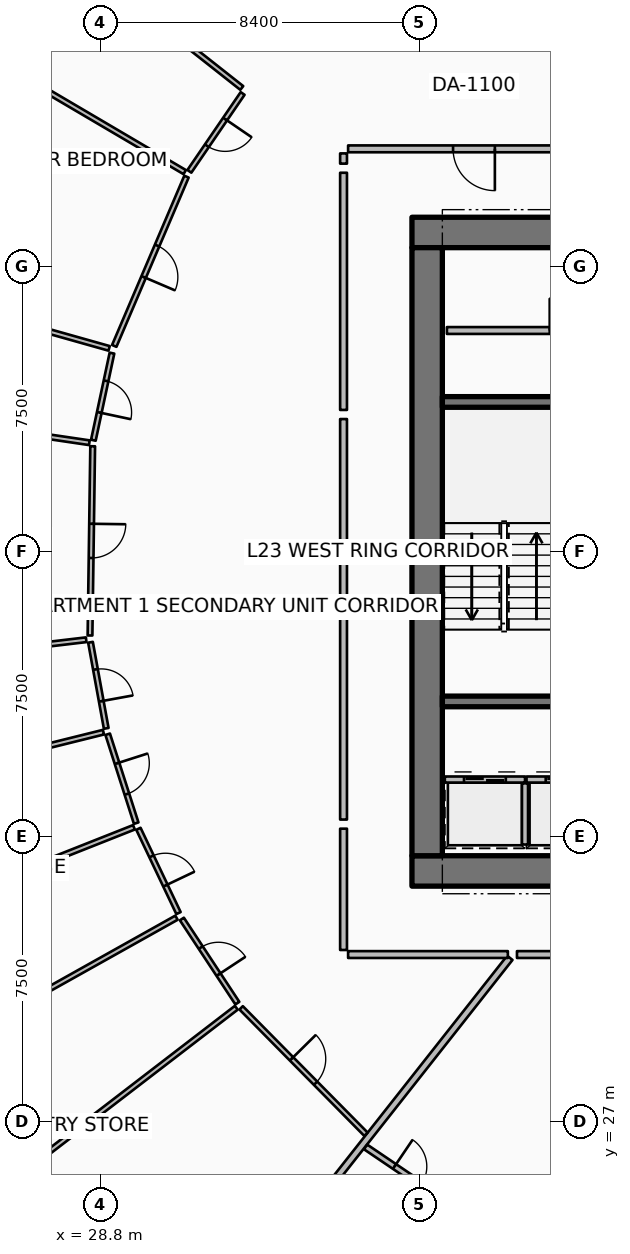
"""IFC4 building model, lengths in metres.
Left out: names, types, materials, properties, quantities, classifications, styles, units other than length and angle.
Written with IfcOpenShell. Run it as: python <this file> out.ifc"""

import sys

from ifc_helpers import new_model, si_unit, direction, frame, frame_2d, origin, place, context, subcontext, project, spatial, rectangle, extrude, element, fill, save


model = new_model("IFC4")
c1 = context("Model", 3, precision=1e-05, world=origin(), true_north=direction((0.0, 1.0)))
c2 = subcontext(c1, "Body", "Model", "MODEL_VIEW")
j1 = project(units=[si_unit("LENGTHUNIT", "METRE"), si_unit("PLANEANGLEUNIT", "RADIAN")], contexts=[c1])
p1 = place(None, origin())
s1 = spatial("IfcSite", under=j1, at=p1, CompositionType="ELEMENT")
p2 = place(p1, origin())
s2 = spatial("IfcBuilding", under=s1, at=p2, CompositionType="ELEMENT")
p3 = place(p2, frame((0.0, 0.0, 93.9)))
s3 = spatial("IfcBuildingStorey", under=s2, at=p3, CompositionType="ELEMENT", Elevation=93.9)
for number, where, z_axis, x_axis in (
    (1, (37.0, 33.6, 0.0), (0.0, 0.0, 1.0), (1.0, 0.0, 0.0)),
    (2, (37.0, 50.4, 0.0), (0.0, 0.0, 1.0), (1.0, 0.0, 0.0)),
):
    element("IfcWall", number, at=place(p3, frame(where, z_axis=z_axis, x_axis=x_axis)), inside=s3, PredefinedType="SHEAR", context=c2, shape_type="SweptSolid", body=[
        extrude(rectangle(XDim=9.9, YDim=0.8, at=frame_2d((4.95, 0.0))), origin(), (0.0, 0.0, 1.0), 3.75),
    ])
p4 = place(p3, frame((37.4, 34.0, 0.0), z_axis=(0.0, 0.0, 1.0), x_axis=(0.0, 1.0, 0.0)))
e3 = element("IfcWall", 3, at=p4, inside=s3, PredefinedType="SHEAR", context=c2, shape_type="SweptSolid", body=[
    extrude(rectangle(XDim=16.0, YDim=0.8, at=frame_2d((8.0, 0.0))), origin(), (0.0, 0.0, 1.0), 3.75),
])
for number, where, z_axis, x_axis in (
    (4, (37.8, 38.06, 0.0), (0.0, 0.0, 1.0), (1.0, 0.0, 0.0)),
    (5, (37.8, 45.94, 0.0), (0.0, 0.0, 1.0), (1.0, 0.0, 0.0)),
):
    element("IfcWall", number, at=place(p3, frame(where, z_axis=z_axis, x_axis=x_axis)), inside=s3, PredefinedType="SHEAR", context=c2, shape_type="SweptSolid", body=[
        extrude(rectangle(XDim=3.5, YDim=0.28, at=frame_2d((1.75, 0.0))), origin(), (0.0, 0.0, 1.0), 3.75),
    ])
p5 = place(p3, frame((37.865, 36.005, 0.0), z_axis=(0.0, 0.0, 1.0), x_axis=(1.0, 0.0, 0.0)))
e6 = element("IfcWall", 6, at=p5, inside=s3, PredefinedType="PARTITIONING", context=c2, shape_type="SweptSolid", body=[
    extrude(rectangle(XDim=2.11, YDim=0.16, at=frame_2d((1.055, 0.0))), origin(), (0.0, 0.0, 1.0), 3.5),
])
p6 = place(p5, frame((0.505, 0.0, 0.0)))
e7 = element("IfcOpeningElement", 7, at=p6, cuts=e6, PredefinedType="OPENING", context=c2, shape_type="SweptSolid", body=[
    extrude(rectangle(XDim=1.1, YDim=2.1, at=frame_2d((0.55, 1.05))), frame((0.0, 0.09, 0.0), z_axis=(0.0, -1.0, 0.0), x_axis=(1.0, 0.0, 0.0)), (0.0, 0.0, 1.0), 0.18),
])
p7 = place(p3, frame((39.975, 34.295, 0.0), z_axis=(0.0, 0.0, 1.0), x_axis=(0.0, 1.0, 0.0)))
e8 = element("IfcWall", 8, at=p7, inside=s3, PredefinedType="PARTITIONING", context=c2, shape_type="SweptSolid", body=[
    extrude(rectangle(XDim=1.61, YDim=0.16, at=frame_2d((0.805, 0.0))), origin(), (0.0, 0.0, 1.0), 3.5),
])
p8 = place(p3, frame((40.015, 36.005, 0.0), z_axis=(0.0, 0.0, 1.0), x_axis=(1.0, 0.0, 0.0)))
e9 = element("IfcWall", 9, at=p8, inside=s3, PredefinedType="PARTITIONING", context=c2, shape_type="SweptSolid", body=[
    extrude(rectangle(XDim=2.11, YDim=0.16, at=frame_2d((1.055, 0.0))), origin(), (0.0, 0.0, 1.0), 3.5),
])
p9 = place(p8, frame((0.505, 0.0, 0.0)))
e10 = element("IfcOpeningElement", 10, at=p9, cuts=e9, PredefinedType="OPENING", context=c2, shape_type="SweptSolid", body=[
    extrude(rectangle(XDim=1.1, YDim=2.1, at=frame_2d((0.55, 1.05))), frame((0.0, 0.09, 0.0), z_axis=(0.0, -1.0, 0.0), x_axis=(1.0, 0.0, 0.0)), (0.0, 0.0, 1.0), 0.18),
])
p10 = place(p3, frame((37.92, 47.82, 0.0), z_axis=(0.0, 0.0, 1.0), x_axis=(1.0, 0.0, 0.0)))
e11 = element("IfcWall", 11, at=p10, inside=s3, PredefinedType="PARTITIONING", context=c2, shape_type="SweptSolid", body=[
    extrude(rectangle(XDim=6.26, YDim=0.18, at=frame_2d((3.13, 0.0))), origin(), (0.0, 0.0, 1.0), 3.5),
])
p11 = place(p10, frame((2.705, 0.0, 0.0)))
e12 = element("IfcOpeningElement", 12, at=p11, cuts=e11, PredefinedType="OPENING", context=c2, shape_type="SweptSolid", body=[
    extrude(rectangle(XDim=0.85, YDim=2.06, at=frame_2d((0.425, 1.03))), frame((0.0, 0.1, 0.0), z_axis=(0.0, -1.0, 0.0), x_axis=(1.0, 0.0, 0.0)), (0.0, 0.0, 1.0), 0.2),
])
p12 = place(p3, frame((39.575, 31.314, 0.0), z_axis=(0.0, 0.0, 1.0), x_axis=(-0.619083417853, -0.785325233098, 0.0)))
e13 = element("IfcWall", 13, at=p12, inside=s3, PredefinedType="PARTITIONING", context=c2, shape_type="SweptSolid", body=[
    extrude(rectangle(XDim=15.063, YDim=0.18, at=frame_2d((7.532, 0.0))), origin(), (0.0, 0.0, 1.0), 2.94),
])
p13 = place(p3, frame((41.944, 52.6, 0.0), z_axis=(0.0, 0.0, 1.0), x_axis=(-1.0, 0.0, 0.0)))
e14 = element("IfcWall", 14, at=p13, inside=s3, PredefinedType="PARTITIONING", context=c2, shape_type="SweptSolid", body=[
    extrude(rectangle(XDim=6.624, YDim=0.18, at=frame_2d((3.312, 0.0))), origin(), (0.0, 0.0, 1.0), 2.94),
])
p14 = place(p13, frame((2.762, 0.0, 0.0)))
e15 = element("IfcOpeningElement", 15, at=p14, cuts=e14, PredefinedType="OPENING", context=c2, shape_type="SweptSolid", body=[
    extrude(rectangle(XDim=1.1, YDim=2.1, at=frame_2d((0.55, 1.05))), frame((0.0, 0.1, 0.0), z_axis=(0.0, -1.0, 0.0), x_axis=(1.0, 0.0, 0.0)), (0.0, 0.0, 1.0), 0.2),
])
p15 = place(p3, frame((35.2, 52.48, 0.0), z_axis=(0.0, 0.0, 1.0), x_axis=(0.0, -1.0, 0.0)))
e16 = element("IfcWall", 16, at=p15, inside=s3, PredefinedType="PARTITIONING", context=c2, shape_type="SweptSolid", body=[
    extrude(rectangle(XDim=0.269, YDim=0.18, at=frame_2d((0.135, 0.0))), origin(), (0.0, 0.0, 1.0), 2.94),
])
p16 = place(p3, frame((35.2, 51.971, 0.0), z_axis=(0.0, 0.0, 1.0), x_axis=(0.0, -1.0, 0.0)))
e17 = element("IfcWall", 17, at=p16, inside=s3, PredefinedType="PARTITIONING", context=c2, shape_type="SweptSolid", body=[
    extrude(rectangle(XDim=6.241, YDim=0.18, at=frame_2d((3.12, 0.0))), origin(), (0.0, 0.0, 1.0), 2.94),
])
p17 = place(p3, frame((32.522, 54.202, 0.0), z_axis=(0.0, 0.0, 1.0), x_axis=(-0.785296086335, 0.619120389574, 0.0)))
e18 = element("IfcWall", 18, at=p17, inside=s3, PredefinedType="PARTITIONING", context=c2, shape_type="SweptSolid", body=[
    extrude(rectangle(XDim=6.529, YDim=0.125, at=frame_2d((3.265, 0.0))), origin(), (0.0, 0.0, 1.0), 2.94),
])
p18 = place(p3, frame((31.021, 51.988, 0.0), z_axis=(0.0, 0.0, 1.0), x_axis=(-0.86191844443, 0.507046935846, 0.0)))
e19 = element("IfcWall", 19, at=p18, inside=s3, PredefinedType="PARTITIONING", context=c2, shape_type="SweptSolid", body=[
    extrude(rectangle(XDim=6.765, YDim=0.125, at=frame_2d((3.383, 0.0))), origin(), (0.0, 0.0, 1.0), 2.94),
])
p19 = place(p3, frame((32.544, 54.057, 0.0), z_axis=(0.0, 0.0, 1.0), x_axis=(-0.564377111566, -0.825517096092, 0.0)))
e20 = element("IfcWall", 20, at=p19, inside=s3, PredefinedType="PARTITIONING", context=c2, shape_type="SweptSolid", body=[
    extrude(rectangle(XDim=2.482, YDim=0.125, at=frame_2d((1.241, 0.0))), origin(), (0.0, 0.0, 1.0), 2.94),
])
p20 = place(p19, frame((0.816, 0.0, 0.0)))
e21 = element("IfcOpeningElement", 21, at=p20, cuts=e20, PredefinedType="OPENING", context=c2, shape_type="SweptSolid", body=[
    extrude(rectangle(XDim=0.85, YDim=2.06, at=frame_2d((0.425, 1.03))), frame((0.0, 0.073, 0.0), z_axis=(0.0, -1.0, 0.0), x_axis=(1.0, 0.0, 0.0)), (0.0, 0.0, 1.0), 0.145),
])
p21 = place(p3, frame((31.067, 51.868, 0.0), z_axis=(0.0, 0.0, 1.0), x_axis=(-0.392470533914, -0.919764578579, 0.0)))
e22 = element("IfcWall", 22, at=p21, inside=s3, PredefinedType="PARTITIONING", context=c2, shape_type="SweptSolid", body=[
    extrude(rectangle(XDim=4.842, YDim=0.125, at=frame_2d((2.421, 0.0))), origin(), (0.0, 0.0, 1.0), 2.94),
])
p22 = place(p21, frame((1.971, 0.0, 0.0)))
e23 = element("IfcOpeningElement", 23, at=p22, cuts=e22, PredefinedType="OPENING", context=c2, shape_type="SweptSolid", body=[
    extrude(rectangle(XDim=0.9, YDim=2.08, at=frame_2d((0.45, 1.04))), frame((0.0, 0.073, 0.0), z_axis=(0.0, -1.0, 0.0), x_axis=(1.0, 0.0, 0.0)), (0.0, 0.0, 1.0), 0.145),
])
p23 = place(p3, frame((35.2, 45.49, 0.0), z_axis=(0.0, 0.0, 1.0), x_axis=(0.0, -1.0, 0.0)))
e24 = element("IfcWall", 24, at=p23, inside=s3, PredefinedType="PARTITIONING", context=c2, shape_type="SweptSolid", body=[
    extrude(rectangle(XDim=4.885, YDim=0.18, at=frame_2d((2.442, 0.0))), origin(), (0.0, 0.0, 1.0), 2.94),
])
p24 = place(p3, frame((29.031, 47.35, 0.0), z_axis=(0.0, 0.0, 1.0), x_axis=(-0.962455027906, 0.271441189317, 0.0)))
e25 = element("IfcWall", 25, at=p24, inside=s3, PredefinedType="PARTITIONING", context=c2, shape_type="SweptSolid", body=[
    extrude(rectangle(XDim=8.862, YDim=0.125, at=frame_2d((4.431, 0.0))), origin(), (0.0, 0.0, 1.0), 2.94),
])
p25 = place(p3, frame((28.511, 44.867, 0.0), z_axis=(0.0, 0.0, 1.0), x_axis=(-0.989349459184, 0.145559773332, 0.0)))
e26 = element("IfcWall", 26, at=p25, inside=s3, PredefinedType="PARTITIONING", context=c2, shape_type="SweptSolid", body=[
    extrude(rectangle(XDim=8.975, YDim=0.125, at=frame_2d((4.488, 0.0))), origin(), (0.0, 0.0, 1.0), 2.94),
])
p26 = place(p3, frame((29.106, 47.225, 0.0), z_axis=(0.0, 0.0, 1.0), x_axis=(-0.208839045871, -0.977950025778, 0.0)))
e27 = element("IfcWall", 27, at=p26, inside=s3, PredefinedType="PARTITIONING", context=c2, shape_type="SweptSolid", body=[
    extrude(rectangle(XDim=2.344, YDim=0.125, at=frame_2d((1.172, 0.0))), origin(), (0.0, 0.0, 1.0), 2.94),
])
p27 = place(p26, frame((0.747, 0.0, 0.0)))
e28 = element("IfcOpeningElement", 28, at=p27, cuts=e27, PredefinedType="OPENING", context=c2, shape_type="SweptSolid", body=[
    extrude(rectangle(XDim=0.85, YDim=2.06, at=frame_2d((0.425, 1.03))), frame((0.0, 0.073, 0.0), z_axis=(0.0, -1.0, 0.0), x_axis=(1.0, 0.0, 0.0)), (0.0, 0.0, 1.0), 0.145),
])
p28 = place(p3, frame((28.599, 44.774, 0.0), z_axis=(0.0, 0.0, 1.0), x_axis=(-0.014168717323, -0.999899618687, 0.0)))
e29 = element("IfcWall", 29, at=p28, inside=s3, PredefinedType="PARTITIONING", context=c2, shape_type="SweptSolid", body=[
    extrude(rectangle(XDim=4.98, YDim=0.125, at=frame_2d((2.49, 0.0))), origin(), (0.0, 0.0, 1.0), 2.94),
])
p29 = place(p28, frame((2.04, 0.0, 0.0)))
e30 = element("IfcOpeningElement", 30, at=p29, cuts=e29, PredefinedType="OPENING", context=c2, shape_type="SweptSolid", body=[
    extrude(rectangle(XDim=0.9, YDim=2.08, at=frame_2d((0.45, 1.04))), frame((0.0, 0.073, 0.0), z_axis=(0.0, -1.0, 0.0), x_axis=(1.0, 0.0, 0.0)), (0.0, 0.0, 1.0), 0.145),
])
p30 = place(p3, frame((35.2, 40.365, 0.0), z_axis=(0.0, 0.0, 1.0), x_axis=(0.0, -1.0, 0.0)))
e31 = element("IfcWall", 31, at=p30, inside=s3, PredefinedType="PARTITIONING", context=c2, shape_type="SweptSolid", body=[
    extrude(rectangle(XDim=5.413, YDim=0.18, at=frame_2d((2.707, 0.0))), origin(), (0.0, 0.0, 1.0), 2.94),
])
p31 = place(p3, frame((28.427, 39.683, 0.0), z_axis=(0.0, 0.0, 1.0), x_axis=(-0.993070374036, -0.117521198991, 0.0)))
e32 = element("IfcWall", 32, at=p31, inside=s3, PredefinedType="PARTITIONING", context=c2, shape_type="SweptSolid", body=[
    extrude(rectangle(XDim=9.77, YDim=0.125, at=frame_2d((4.885, 0.0))), origin(), (0.0, 0.0, 1.0), 2.94),
])
p32 = place(p3, frame((28.882, 37.251, 0.0), z_axis=(0.0, 0.0, 1.0), x_axis=(-0.970501778917, -0.241093959111, 0.0)))
e33 = element("IfcWall", 33, at=p32, inside=s3, PredefinedType="PARTITIONING", context=c2, shape_type="SweptSolid", body=[
    extrude(rectangle(XDim=9.286, YDim=0.125, at=frame_2d((4.643, 0.0))), origin(), (0.0, 0.0, 1.0), 2.94),
])
p33 = place(p3, frame((29.684, 34.748, 0.0), z_axis=(0.0, 0.0, 1.0), x_axis=(-0.929782203012, -0.36811011255, 0.0)))
e34 = element("IfcWall", 34, at=p33, inside=s3, PredefinedType="PARTITIONING", context=c2, shape_type="SweptSolid", body=[
    extrude(rectangle(XDim=9.271, YDim=0.125, at=frame_2d((4.635, 0.0))), origin(), (0.0, 0.0, 1.0), 2.94),
])
p34 = place(p3, frame((28.541, 39.616, 0.0), z_axis=(0.0, 0.0, 1.0), x_axis=(0.179631908925, -0.983733895571, 0.0)))
e35 = element("IfcWall", 35, at=p34, inside=s3, PredefinedType="PARTITIONING", context=c2, shape_type="SweptSolid", body=[
    extrude(rectangle(XDim=2.302, YDim=0.125, at=frame_2d((1.151, 0.0))), origin(), (0.0, 0.0, 1.0), 2.94),
])
p35 = place(p34, frame((0.726, 0.0, 0.0)))
e36 = element("IfcOpeningElement", 36, at=p35, cuts=e35, PredefinedType="OPENING", context=c2, shape_type="SweptSolid", body=[
    extrude(rectangle(XDim=0.85, YDim=2.06, at=frame_2d((0.425, 1.03))), frame((0.0, 0.073, 0.0), z_axis=(0.0, -1.0, 0.0), x_axis=(1.0, 0.0, 0.0)), (0.0, 0.0, 1.0), 0.145),
])
p36 = place(p3, frame((28.994, 37.197, 0.0), z_axis=(0.0, 0.0, 1.0), x_axis=(0.305352731689, -0.952239313014, 0.0)))
e37 = element("IfcWall", 37, at=p36, inside=s3, PredefinedType="PARTITIONING", context=c2, shape_type="SweptSolid", body=[
    extrude(rectangle(XDim=2.456, YDim=0.125, at=frame_2d((1.228, 0.0))), origin(), (0.0, 0.0, 1.0), 2.94),
])
p37 = place(p36, frame((0.803, 0.0, 0.0)))
e38 = element("IfcOpeningElement", 38, at=p37, cuts=e37, PredefinedType="OPENING", context=c2, shape_type="SweptSolid", body=[
    extrude(rectangle(XDim=0.85, YDim=2.06, at=frame_2d((0.425, 1.03))), frame((0.0, 0.073, 0.0), z_axis=(0.0, -1.0, 0.0), x_axis=(1.0, 0.0, 0.0)), (0.0, 0.0, 1.0), 0.145),
])
p38 = place(p3, frame((29.802, 34.709, 0.0), z_axis=(0.0, 0.0, 1.0), x_axis=(0.429431892781, -0.90309924674, 0.0)))
e39 = element("IfcWall", 39, at=p38, inside=s3, PredefinedType="PARTITIONING", context=c2, shape_type="SweptSolid", body=[
    extrude(rectangle(XDim=2.456, YDim=0.125, at=frame_2d((1.228, 0.0))), origin(), (0.0, 0.0, 1.0), 2.94),
])
p39 = place(p38, frame((0.803, 0.0, 0.0)))
e40 = element("IfcOpeningElement", 40, at=p39, cuts=e39, PredefinedType="OPENING", context=c2, shape_type="SweptSolid", body=[
    extrude(rectangle(XDim=0.85, YDim=2.06, at=frame_2d((0.425, 1.03))), frame((0.0, 0.073, 0.0), z_axis=(0.0, -1.0, 0.0), x_axis=(1.0, 0.0, 0.0)), (0.0, 0.0, 1.0), 0.145),
])
p40 = place(p3, frame((35.2, 34.712, 0.0), z_axis=(0.0, 0.0, 1.0), x_axis=(0.0, -1.0, 0.0)))
e41 = element("IfcWall", 41, at=p40, inside=s3, PredefinedType="PARTITIONING", context=c2, shape_type="SweptSolid", body=[
    extrude(rectangle(XDim=3.192, YDim=0.18, at=frame_2d((1.596, 0.0))), origin(), (0.0, 0.0, 1.0), 2.94),
])
p41 = place(p3, frame((35.32, 31.4, 0.0), z_axis=(0.0, 0.0, 1.0), x_axis=(1.0, 0.0, 0.0)))
e42 = element("IfcWall", 42, at=p41, inside=s3, PredefinedType="PARTITIONING", context=c2, shape_type="SweptSolid", body=[
    extrude(rectangle(XDim=4.204, YDim=0.18, at=frame_2d((2.102, 0.0))), origin(), (0.0, 0.0, 1.0), 2.94),
])
p42 = place(p3, frame((30.804, 32.37, 0.0), z_axis=(0.0, 0.0, 1.0), x_axis=(-0.872500902675, -0.488612499668, 0.0)))
e43 = element("IfcWall", 43, at=p42, inside=s3, PredefinedType="PARTITIONING", context=c2, shape_type="SweptSolid", body=[
    extrude(rectangle(XDim=9.77, YDim=0.125, at=frame_2d((4.885, 0.0))), origin(), (0.0, 0.0, 1.0), 2.94),
])
p43 = place(p3, frame((32.378, 30.0, 0.0), z_axis=(0.0, 0.0, 1.0), x_axis=(-0.793018359225, -0.609197736315, 0.0)))
e44 = element("IfcWall", 44, at=p43, inside=s3, PredefinedType="PARTITIONING", context=c2, shape_type="SweptSolid", body=[
    extrude(rectangle(XDim=9.409, YDim=0.125, at=frame_2d((4.704, 0.0))), origin(), (0.0, 0.0, 1.0), 2.94),
])
p44 = place(p3, frame((30.946, 32.335, 0.0), z_axis=(0.0, 0.0, 1.0), x_axis=(0.55037901545, -0.83491492941, 0.0)))
e45 = element("IfcWall", 45, at=p44, inside=s3, PredefinedType="PARTITIONING", context=c2, shape_type="SweptSolid", body=[
    extrude(rectangle(XDim=2.651, YDim=0.125, at=frame_2d((1.326, 0.0))), origin(), (0.0, 0.0, 1.0), 2.94),
])
p45 = place(p44, frame((0.901, 0.0, 0.0)))
e46 = element("IfcOpeningElement", 46, at=p45, cuts=e45, PredefinedType="OPENING", context=c2, shape_type="SweptSolid", body=[
    extrude(rectangle(XDim=0.85, YDim=2.06, at=frame_2d((0.425, 1.03))), frame((0.0, 0.073, 0.0), z_axis=(0.0, -1.0, 0.0), x_axis=(1.0, 0.0, 0.0)), (0.0, 0.0, 1.0), 0.145),
])
p46 = place(p3, frame((32.506, 29.998, 0.0), z_axis=(0.0, 0.0, 1.0), x_axis=(0.702626830151, -0.711558527144, 0.0)))
e47 = element("IfcWall", 47, at=p46, inside=s3, PredefinedType="PARTITIONING", context=c2, shape_type="SweptSolid", body=[
    extrude(rectangle(XDim=4.674, YDim=0.125, at=frame_2d((2.337, 0.0))), origin(), (0.0, 0.0, 1.0), 2.94),
])
p47 = place(p46, frame((1.887, 0.0, 0.0)))
e48 = element("IfcOpeningElement", 48, at=p47, cuts=e47, PredefinedType="OPENING", context=c2, shape_type="SweptSolid", body=[
    extrude(rectangle(XDim=0.9, YDim=2.08, at=frame_2d((0.45, 1.04))), frame((0.0, 0.073, 0.0), z_axis=(0.0, -1.0, 0.0), x_axis=(1.0, 0.0, 0.0)), (0.0, 0.0, 1.0), 0.145),
])
p48 = place(p3, frame((39.764, 31.4, 0.0), z_axis=(0.0, 0.0, 1.0), x_axis=(1.0, 0.0, 0.0)))
e49 = element("IfcWall", 49, at=p48, inside=s3, PredefinedType="PARTITIONING", context=c2, shape_type="SweptSolid", body=[
    extrude(rectangle(XDim=5.127, YDim=0.18, at=frame_2d((2.563, 0.0))), origin(), (0.0, 0.0, 1.0), 2.94),
])
p49 = place(p3, frame((35.78, 26.338, 0.0), z_axis=(0.0, 0.0, 1.0), x_axis=(0.828087409359, -0.560599003264, 0.0)))
e50 = element("IfcWall", 50, at=p49, inside=s3, PredefinedType="PARTITIONING", context=c2, shape_type="SweptSolid", body=[
    extrude(rectangle(XDim=2.687, YDim=0.15, at=frame_2d((1.344, 0.0))), origin(), (0.0, 0.0, 1.0), 2.94),
])
p50 = place(p49, frame((0.918, 0.0, 0.0)))
e51 = element("IfcOpeningElement", 51, at=p50, cuts=e50, PredefinedType="OPENING", context=c2, shape_type="SweptSolid", body=[
    extrude(rectangle(XDim=0.85, YDim=2.06, at=frame_2d((0.425, 1.03))), frame((0.0, 0.085, 0.0), z_axis=(0.0, -1.0, 0.0), x_axis=(1.0, 0.0, 0.0)), (0.0, 0.0, 1.0), 0.17),
])
p51 = place(p6, origin())
e52 = element("IfcDoor", 52, at=p51, inside=s3, OperationType="DOUBLE_DOOR_SLIDING", PredefinedType="DOOR", context=c2, shape_type="SweptSolid", body=[
    extrude(rectangle(XDim=1.1, YDim=2.1, at=frame_2d((0.55, 1.05))), frame((0.0, 0.025, 0.0), z_axis=(0.0, -1.0, 0.0), x_axis=(1.0, 0.0, 0.0)), (0.0, 0.0, 1.0), 0.05),
])
fill(e7, e52)
p52 = place(p9, origin())
e53 = element("IfcDoor", 53, at=p52, inside=s3, OperationType="DOUBLE_DOOR_SLIDING", PredefinedType="DOOR", context=c2, shape_type="SweptSolid", body=[
    extrude(rectangle(XDim=1.1, YDim=2.1, at=frame_2d((0.55, 1.05))), frame((0.0, 0.025, 0.0), z_axis=(0.0, -1.0, 0.0), x_axis=(1.0, 0.0, 0.0)), (0.0, 0.0, 1.0), 0.05),
])
fill(e10, e53)
p53 = place(p11, origin())
e54 = element("IfcDoor", 54, at=p53, inside=s3, OperationType="SINGLE_SWING_LEFT", PredefinedType="DOOR", context=c2, shape_type="SweptSolid", body=[
    extrude(rectangle(XDim=0.85, YDim=2.06, at=frame_2d((0.425, 1.03))), frame((0.0, 0.025, 0.0), z_axis=(0.0, -1.0, 0.0), x_axis=(1.0, 0.0, 0.0)), (0.0, 0.0, 1.0), 0.05),
])
fill(e12, e54)
p54 = place(p14, origin())
e55 = element("IfcDoor", 55, at=p54, inside=s3, OperationType="SINGLE_SWING_LEFT", PredefinedType="DOOR", context=c2, shape_type="SweptSolid", body=[
    extrude(rectangle(XDim=1.1, YDim=2.1, at=frame_2d((0.55, 1.05))), frame((0.0, 0.025, 0.0), z_axis=(0.0, -1.0, 0.0), x_axis=(1.0, 0.0, 0.0)), (0.0, 0.0, 1.0), 0.05),
])
fill(e15, e55)
p55 = place(p20, origin())
e56 = element("IfcDoor", 56, at=p55, inside=s3, OperationType="SINGLE_SWING_LEFT", PredefinedType="DOOR", context=c2, shape_type="SweptSolid", body=[
    extrude(rectangle(XDim=0.85, YDim=2.06, at=frame_2d((0.425, 1.03))), frame((0.0, 0.025, 0.0), z_axis=(0.0, -1.0, 0.0), x_axis=(1.0, 0.0, 0.0)), (0.0, 0.0, 1.0), 0.05),
])
fill(e21, e56)
p56 = place(p22, origin())
e57 = element("IfcDoor", 57, at=p56, inside=s3, OperationType="SINGLE_SWING_RIGHT", PredefinedType="DOOR", context=c2, shape_type="SweptSolid", body=[
    extrude(rectangle(XDim=0.9, YDim=2.08, at=frame_2d((0.45, 1.04))), frame((0.0, 0.025, 0.0), z_axis=(0.0, -1.0, 0.0), x_axis=(1.0, 0.0, 0.0)), (0.0, 0.0, 1.0), 0.05),
])
fill(e23, e57)
p57 = place(p27, origin())
e58 = element("IfcDoor", 58, at=p57, inside=s3, OperationType="SINGLE_SWING_RIGHT", PredefinedType="DOOR", context=c2, shape_type="SweptSolid", body=[
    extrude(rectangle(XDim=0.85, YDim=2.06, at=frame_2d((0.425, 1.03))), frame((0.0, 0.025, 0.0), z_axis=(0.0, -1.0, 0.0), x_axis=(1.0, 0.0, 0.0)), (0.0, 0.0, 1.0), 0.05),
])
fill(e28, e58)
p58 = place(p29, origin())
e59 = element("IfcDoor", 59, at=p58, inside=s3, OperationType="SINGLE_SWING_LEFT", PredefinedType="DOOR", context=c2, shape_type="SweptSolid", body=[
    extrude(rectangle(XDim=0.9, YDim=2.08, at=frame_2d((0.45, 1.04))), frame((0.0, 0.025, 0.0), z_axis=(0.0, -1.0, 0.0), x_axis=(1.0, 0.0, 0.0)), (0.0, 0.0, 1.0), 0.05),
])
fill(e30, e59)
p59 = place(p35, origin())
e60 = element("IfcDoor", 60, at=p59, inside=s3, OperationType="SINGLE_SWING_RIGHT", PredefinedType="DOOR", context=c2, shape_type="SweptSolid", body=[
    extrude(rectangle(XDim=0.85, YDim=2.06, at=frame_2d((0.425, 1.03))), frame((0.0, 0.025, 0.0), z_axis=(0.0, -1.0, 0.0), x_axis=(1.0, 0.0, 0.0)), (0.0, 0.0, 1.0), 0.05),
])
fill(e36, e60)
p60 = place(p37, origin())
e61 = element("IfcDoor", 61, at=p60, inside=s3, OperationType="SINGLE_SWING_LEFT", PredefinedType="DOOR", context=c2, shape_type="SweptSolid", body=[
    extrude(rectangle(XDim=0.85, YDim=2.06, at=frame_2d((0.425, 1.03))), frame((0.0, 0.025, 0.0), z_axis=(0.0, -1.0, 0.0), x_axis=(1.0, 0.0, 0.0)), (0.0, 0.0, 1.0), 0.05),
])
fill(e38, e61)
p61 = place(p39, origin())
e62 = element("IfcDoor", 62, at=p61, inside=s3, OperationType="SINGLE_SWING_RIGHT", PredefinedType="DOOR", context=c2, shape_type="SweptSolid", body=[
    extrude(rectangle(XDim=0.85, YDim=2.06, at=frame_2d((0.425, 1.03))), frame((0.0, 0.025, 0.0), z_axis=(0.0, -1.0, 0.0), x_axis=(1.0, 0.0, 0.0)), (0.0, 0.0, 1.0), 0.05),
])
fill(e40, e62)
p62 = place(p45, origin())
e63 = element("IfcDoor", 63, at=p62, inside=s3, OperationType="SINGLE_SWING_RIGHT", PredefinedType="DOOR", context=c2, shape_type="SweptSolid", body=[
    extrude(rectangle(XDim=0.85, YDim=2.06, at=frame_2d((0.425, 1.03))), frame((0.0, 0.025, 0.0), z_axis=(0.0, -1.0, 0.0), x_axis=(1.0, 0.0, 0.0)), (0.0, 0.0, 1.0), 0.05),
])
fill(e46, e63)
p63 = place(p47, origin())
e64 = element("IfcDoor", 64, at=p63, inside=s3, OperationType="SINGLE_SWING_LEFT", PredefinedType="DOOR", context=c2, shape_type="SweptSolid", body=[
    extrude(rectangle(XDim=0.9, YDim=2.08, at=frame_2d((0.45, 1.04))), frame((0.0, 0.025, 0.0), z_axis=(0.0, -1.0, 0.0), x_axis=(1.0, 0.0, 0.0)), (0.0, 0.0, 1.0), 0.05),
])
fill(e48, e64)
p64 = place(p50, origin())
e65 = element("IfcDoor", 65, at=p64, inside=s3, OperationType="SINGLE_SWING_LEFT", PredefinedType="DOOR", context=c2, shape_type="SweptSolid", body=[
    extrude(rectangle(XDim=0.85, YDim=2.06, at=frame_2d((0.425, 1.03))), frame((0.0, 0.025, 0.0), z_axis=(0.0, -1.0, 0.0), x_axis=(1.0, 0.0, 0.0)), (0.0, 0.0, 1.0), 0.05),
])
fill(e51, e65)
save(model, sys.argv[1])
